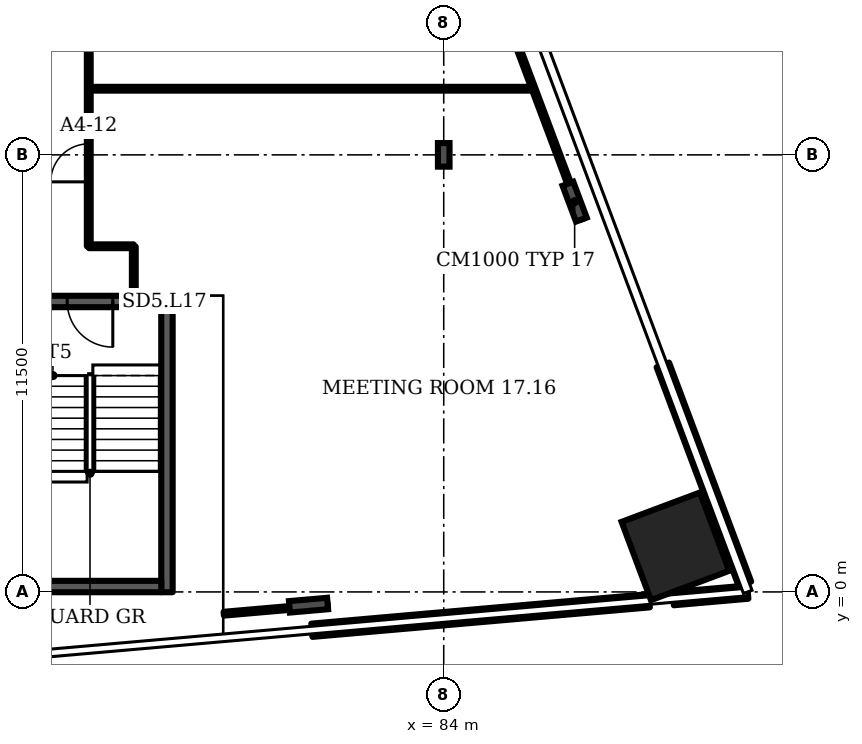
"""IFC4 building model, lengths in metres.
Left out: names, types, materials, properties, quantities, classifications, styles, units other than length and angle.
Written with IfcOpenShell. Run it as: python <this file> out.ifc"""

import sys

from ifc_helpers import new_model, si_unit, direction, frame, frame_2d, origin, origin_2d, place, context, subcontext, project, spatial, rectangle, i_section, extrude, element, fill, save


model = new_model("IFC4")
c1 = context("Model", 3, precision=1e-05, world=origin(), true_north=direction((0.0, 1.0)))
c2 = subcontext(c1, "Body", "Model", "MODEL_VIEW")
j1 = project(units=[si_unit("LENGTHUNIT", "METRE"), si_unit("PLANEANGLEUNIT", "RADIAN")], contexts=[c1])
p1 = place(None, origin())
s1 = spatial("IfcSite", under=j1, at=p1, CompositionType="ELEMENT")
p2 = place(p1, origin())
s2 = spatial("IfcBuilding", under=s1, at=p2, CompositionType="ELEMENT")
p3 = place(p2, frame((0.0, 0.0, 81.1)))
s3 = spatial("IfcBuildingStorey", under=s2, at=p3, CompositionType="ELEMENT", Elevation=81.1)
p4 = place(p3, frame((90.096, 1.2, 0.0), z_axis=(0.0, 0.0, 1.0), x_axis=(-0.351123, 0.936328, 0.0)))
e1 = element("IfcColumn", 1, at=p4, inside=s3, PredefinedType="COLUMN", context=c2, shape_type="SweptSolid", body=[
    extrude(rectangle(XDim=2.2, YDim=2.2, at=origin_2d()), origin(), (0.0, 0.0, 1.0), 3.6),
])
for number, where, z_axis, x_axis in (
    (2, (80.442, -0.349, 0.0), (0.0, 0.0, 1.0), (0.087, -0.996, 0.0)),
    (3, (87.445, 10.268, 0.0), (0.0, 0.0, 1.0), (0.936, 0.351, 0.0)),
):
    element("IfcColumn", number, at=place(p3, frame(where, z_axis=z_axis, x_axis=x_axis)), inside=s3, PredefinedType="COLUMN", context=c2, shape_type="SweptSolid", body=[
        extrude(i_section(OverallWidth=0.302, OverallDepth=1.008, WebThickness=0.021, FlangeThickness=0.04, FilletRadius=0.03, at=origin_2d()), origin(), (0.0, 0.0, 1.0), 3.6),
    ])
p5 = place(p3, frame((84.0, 11.5, 0.0), z_axis=(0.0, 0.0, 1.0), x_axis=(1.0, 0.0, 0.0)))
e4 = element("IfcColumn", 4, at=p5, inside=s3, PredefinedType="COLUMN", context=c2, shape_type="SweptSolid", body=[
    extrude(i_section(OverallWidth=0.305, OverallDepth=0.62, WebThickness=0.021, FlangeThickness=0.04, FilletRadius=0.027, at=origin_2d()), origin(), (0.0, 0.0, 1.0), 3.6),
])
p6 = place(p3, frame((80.53, -1.009, 0.0), z_axis=(0.0, 0.0, 1.0), x_axis=(0.996198, 0.087169, 0.0)))
e5 = element("IfcWall", 5, at=p6, inside=s3, PredefinedType="SOLIDWALL", context=c2, shape_type="SweptSolid", body=[
    extrude(rectangle(XDim=8.912, YDim=0.35, at=frame_2d((4.456, 0.0))), origin(), (0.0, 0.0, 1.0), 1.0),
])
p7 = place(p3, frame((90.039, -0.177, 0.0), z_axis=(0.0, 0.0, 1.0), x_axis=(0.996193, 0.08717, 0.0)))
e6 = element("IfcWall", 6, at=p7, inside=s3, PredefinedType="SOLIDWALL", context=c2, shape_type="SweptSolid", body=[
    extrude(rectangle(XDim=1.969, YDim=0.35, at=frame_2d((0.984, 0.0))), origin(), (0.0, 0.0, 1.0), 1.0),
])
p8 = place(p3, frame((91.926, 0.211, 0.0), z_axis=(0.0, 0.0, 1.0), x_axis=(-0.351118, 0.936328, 0.0)))
e7 = element("IfcWall", 7, at=p8, inside=s3, PredefinedType="SOLIDWALL", context=c2, shape_type="SweptSolid", body=[
    extrude(rectangle(XDim=6.154, YDim=0.35, at=frame_2d((3.077, 0.0))), origin(), (0.0, 0.0, 1.0), 1.0),
])
p9 = place(p3, frame((72.518, 7.642, 0.0), z_axis=(0.0, 0.0, 1.0), x_axis=(1.0, 0.0, 0.0)))
e8 = element("IfcWall", 8, at=p9, inside=s3, PredefinedType="SHEAR", context=c2, shape_type="SweptSolid", body=[
    extrude(rectangle(XDim=4.35, YDim=0.3, at=frame_2d((2.175, 0.0))), origin(), (0.0, 0.0, 1.0), 3.2),
])
p10 = place(p9, frame((1.575, 0.0, 0.0)))
e9 = element("IfcOpeningElement", 9, at=p10, cuts=e8, PredefinedType="OPENING", context=c2, shape_type="SweptSolid", body=[
    extrude(rectangle(XDim=1.2, YDim=2.1, at=frame_2d((0.6, 1.05))), frame((0.0, 0.16, 0.0), z_axis=(0.0, -1.0, 0.0), x_axis=(1.0, 0.0, 0.0)), (0.0, 0.0, 1.0), 0.32),
])
p11 = place(p3, frame((74.66, 9.095, 0.0), z_axis=(0.0, 0.0, 1.0), x_axis=(0.0, 1.0, 0.0)))
e10 = element("IfcWall", 10, at=p11, inside=s3, PredefinedType="PARTITIONING", context=c2, shape_type="SweptSolid", body=[
    extrude(rectangle(XDim=14.23, YDim=0.1, at=frame_2d((7.115, 0.0))), origin(), (0.0, 0.0, 1.0), 3.2),
])
p12 = place(p11, frame((1.695, 0.0, 0.0)))
e11 = element("IfcOpeningElement", 11, at=p12, cuts=e10, PredefinedType="OPENING", context=c2, shape_type="SweptSolid", body=[
    extrude(rectangle(XDim=1.0, YDim=2.1, at=frame_2d((0.5, 1.05))), frame((0.0, 0.06, 0.0), z_axis=(0.0, -1.0, 0.0), x_axis=(1.0, 0.0, 0.0)), (0.0, 0.0, 1.0), 0.12),
])
p13 = place(p11, frame((7.965, 0.0, 0.0)))
e12 = element("IfcOpeningElement", 12, at=p13, cuts=e10, PredefinedType="OPENING", context=c2, shape_type="SweptSolid", body=[
    extrude(rectangle(XDim=1.0, YDim=2.1, at=frame_2d((0.5, 1.05))), frame((0.0, 0.06, 0.0), z_axis=(0.0, -1.0, 0.0), x_axis=(1.0, 0.0, 0.0)), (0.0, 0.0, 1.0), 0.12),
])
p14 = place(p3, frame((74.665, 9.095, 0.0), z_axis=(0.0, 0.0, 1.0), x_axis=(1.0, 0.0, 0.0)))
e13 = element("IfcWall", 13, at=p14, inside=s3, PredefinedType="PARTITIONING", context=c2, shape_type="SweptSolid", body=[
    extrude(rectangle(XDim=1.175, YDim=0.1, at=frame_2d((0.587, 0.0))), origin(), (0.0, 0.0, 1.0), 3.2),
])
p15 = place(p3, frame((74.665, 13.24, 0.0), z_axis=(0.0, 0.0, 1.0), x_axis=(1.0, 0.0, 0.0)))
e14 = element("IfcWall", 14, at=p15, inside=s3, PredefinedType="PARTITIONING", context=c2, shape_type="SweptSolid", body=[
    extrude(rectangle(XDim=11.7, YDim=0.1, at=frame_2d((5.85, 0.0))), origin(), (0.0, 0.0, 1.0), 3.2),
])
p16 = place(p3, frame((75.845, 7.812, 0.0), z_axis=(0.0, 0.0, 1.0), x_axis=(0.0, 1.0, 0.0)))
e15 = element("IfcWall", 15, at=p16, inside=s3, PredefinedType="PARTITIONING", context=c2, shape_type="SweptSolid", body=[
    extrude(rectangle(XDim=1.278, YDim=0.1, at=frame_2d((0.639, 0.0))), origin(), (0.0, 0.0, 1.0), 3.2),
])
p17 = place(p3, frame((78.212, -0.573, 0.0), z_axis=(0.0, 0.0, 1.0), x_axis=(0.996224, 0.086779, 0.0)))
e16 = element("IfcWall", 16, at=p17, inside=s3, PredefinedType="PARTITIONING", context=c2, shape_type="SweptSolid", body=[
    extrude(rectangle(XDim=2.743, YDim=0.1, at=frame_2d((1.372, 0.0))), origin(), (0.0, 0.0, 1.0), 2.58),
])
p18 = place(p3, frame((87.65, 9.81, 0.0), z_axis=(0.0, 0.0, 1.0), x_axis=(-0.35104, 0.936357, 0.0)))
e17 = element("IfcWall", 17, at=p18, inside=s3, PredefinedType="PARTITIONING", context=c2, shape_type="SweptSolid", body=[
    extrude(rectangle(XDim=12.997, YDim=0.1, at=frame_2d((6.499, 0.0))), origin(), (0.0, 0.0, 1.0), 2.58),
])
p19 = place(p3, frame((76.718, -0.008, 0.0), z_axis=(0.0, 0.0, 1.0), x_axis=(0.0, 1.0, 0.0)))
e18 = element("IfcWall", 18, at=p19, inside=s3, PredefinedType="SHEAR", context=c2, shape_type="SweptSolid", body=[
    extrude(rectangle(XDim=7.5, YDim=0.3, at=frame_2d((3.75, 0.0))), origin(), (0.0, 0.0, 1.0), 3.2),
])
p20 = place(p3, frame((72.817, 0.142, 0.0), z_axis=(0.0, 0.0, 1.0), x_axis=(1.0, 0.0, 0.0)))
e19 = element("IfcWall", 19, at=p20, inside=s3, PredefinedType="SHEAR", context=c2, shape_type="SweptSolid", body=[
    extrude(rectangle(XDim=3.75, YDim=0.3, at=frame_2d((1.875, 0.0))), origin(), (0.0, 0.0, 1.0), 3.2),
])
p21 = place(p10, origin())
e20 = element("IfcDoor", 20, at=p21, inside=s3, OperationType="SINGLE_SWING_RIGHT", PredefinedType="DOOR", context=c2, shape_type="SweptSolid", body=[
    extrude(rectangle(XDim=1.2, YDim=2.1, at=frame_2d((0.6, 1.05))), frame((0.0, 0.025, 0.0), z_axis=(0.0, -1.0, 0.0), x_axis=(1.0, 0.0, 0.0)), (0.0, 0.0, 1.0), 0.05),
])
fill(e9, e20)
p22 = place(p12, origin())
e21 = element("IfcDoor", 21, at=p22, inside=s3, OperationType="SINGLE_SWING_LEFT", PredefinedType="DOOR", context=c2, shape_type="SweptSolid", body=[
    extrude(rectangle(XDim=1.0, YDim=2.1, at=frame_2d((0.5, 1.05))), frame((0.0, 0.025, 0.0), z_axis=(0.0, -1.0, 0.0), x_axis=(1.0, 0.0, 0.0)), (0.0, 0.0, 1.0), 0.05),
])
fill(e11, e21)
save(model, sys.argv[1])
